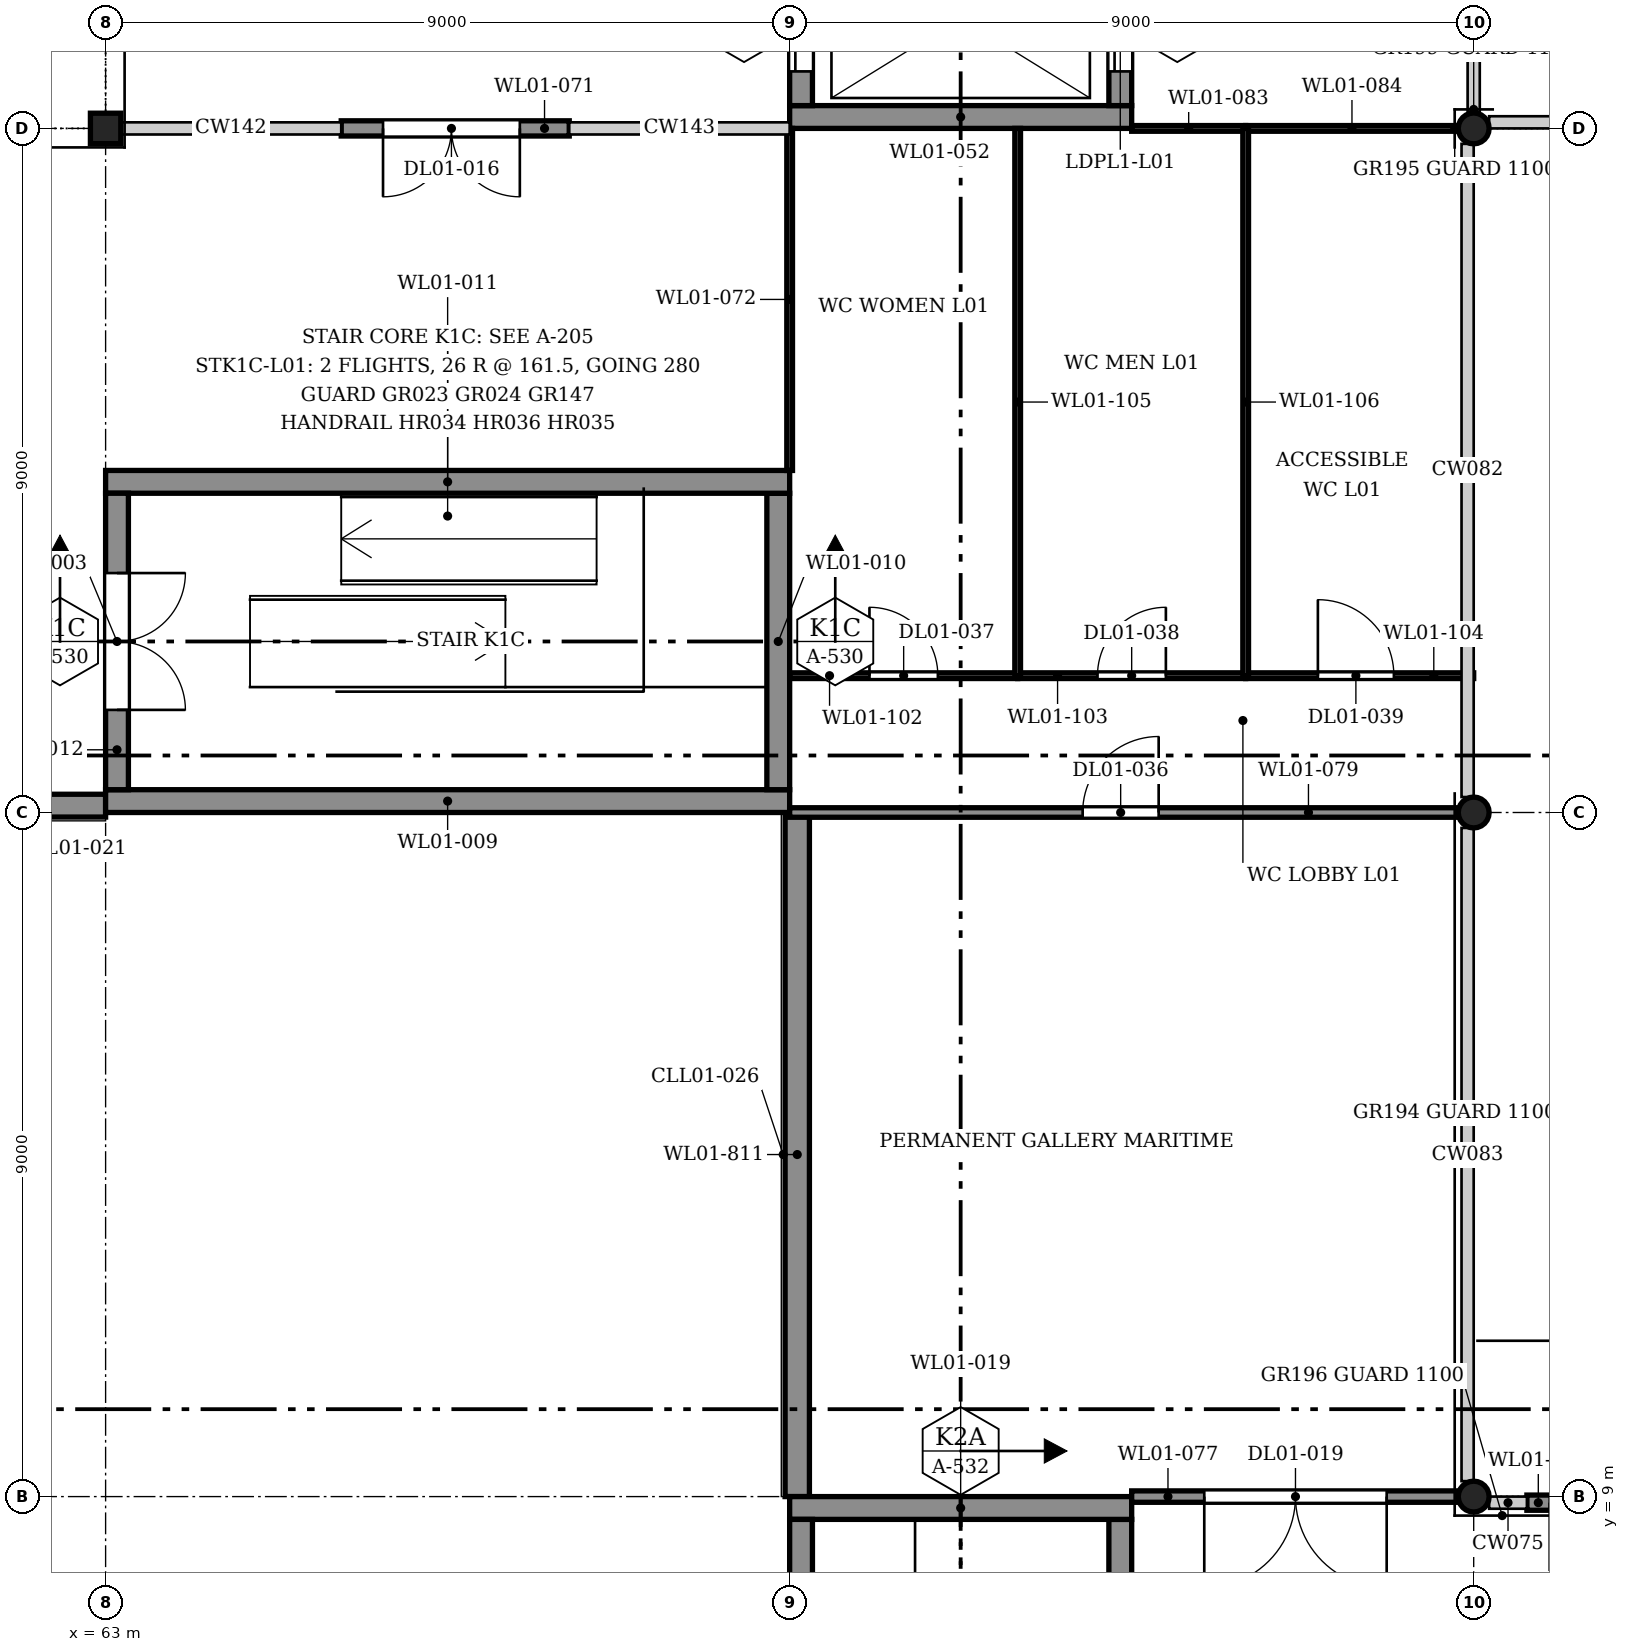
"""IFC4 building model, lengths in metres.
Left out: names, types, materials, properties, quantities, classifications, styles, units other than length and angle.
Written with IfcOpenShell. Run it as: python <this file> out.ifc"""

import sys

from ifc_helpers import new_model, si_unit, direction, frame, frame_2d, origin, origin_2d, place, context, subcontext, project, spatial, rectangle, hollow_rectangle, hollow_circle, extrude, element, fill, save


model = new_model("IFC4")
c1 = context("Model", 3, precision=1e-05, world=origin(), true_north=direction((0.0, 1.0)))
c2 = subcontext(c1, "Body", "Model", "MODEL_VIEW")
j1 = project(units=[si_unit("LENGTHUNIT", "METRE"), si_unit("PLANEANGLEUNIT", "RADIAN")], contexts=[c1])
p1 = place(None, origin())
s1 = spatial("IfcSite", under=j1, at=p1, CompositionType="ELEMENT")
p2 = place(p1, origin())
s2 = spatial("IfcBuilding", under=s1, at=p2, CompositionType="ELEMENT")
p3 = place(p2, frame((0.0, 0.0, 5.0)))
s3 = spatial("IfcBuildingStorey", under=s2, at=p3, CompositionType="ELEMENT", Elevation=5.0)
for number, where, z_axis, x_axis in (
    (1, (81.0, 9.0, 0.0), (0.0, 0.0, 1.0), (1.0, 0.0, 0.0)),
    (2, (81.0, 18.0, 0.0), (0.0, 0.0, 1.0), (1.0, 0.0, 0.0)),
):
    element("IfcColumn", number, at=place(p3, frame(where, z_axis=z_axis, x_axis=x_axis)), inside=s3, PredefinedType="COLUMN", context=c2, shape_type="SweptSolid", body=[
        extrude(hollow_circle(Radius=0.203, WallThickness=0.013, at=origin_2d()), origin(), (0.0, 0.0, 1.0), 4.2),
    ])
p4 = place(p3, frame((63.0, 27.0, 0.0), z_axis=(0.0, 0.0, 1.0), x_axis=(1.0, 0.0, 0.0)))
e3 = element("IfcColumn", 3, at=p4, inside=s3, PredefinedType="COLUMN", context=c2, shape_type="SweptSolid", body=[
    extrude(hollow_rectangle(XDim=0.4, YDim=0.4, WallThickness=0.016, InnerFilletRadius=0.024, OuterFilletRadius=0.04, at=origin_2d()), origin(), (0.0, 0.0, 1.0), 4.2),
])
p5 = place(p3, frame((81.0, 27.0, 0.0), z_axis=(0.0, 0.0, 1.0), x_axis=(1.0, 0.0, 0.0)))
e4 = element("IfcColumn", 4, at=p5, inside=s3, PredefinedType="COLUMN", context=c2, shape_type="SweptSolid", body=[
    extrude(hollow_circle(Radius=0.203, WallThickness=0.013, at=origin_2d()), origin(), (0.0, 0.0, 1.0), 4.2),
])
p6 = place(p3, frame((54.25, 18.09, 0.0), z_axis=(0.0, 0.0, 1.0), x_axis=(1.0, 0.0, 0.0)))
e5 = element("IfcWall", 5, at=p6, inside=s3, PredefinedType="SOLIDWALL", context=c2, shape_type="SweptSolid", body=[
    extrude(rectangle(XDim=8.75, YDim=0.3, at=frame_2d((4.375, 0.0))), origin(), (0.0, 0.0, 1.0), 3.578),
])
p7 = place(p6, frame((1.4, 0.0, 0.9)))
e6 = element("IfcOpeningElement", 6, at=p7, cuts=e5, PredefinedType="OPENING", context=c2, shape_type="SweptSolid", body=[
    extrude(rectangle(XDim=1.2, YDim=2.3, at=frame_2d((0.6, 1.15))), frame((0.0, 0.16, 0.0), z_axis=(0.0, -1.0, 0.0), x_axis=(1.0, 0.0, 0.0)), (0.0, 0.0, 1.0), 0.32),
])
p8 = place(p6, frame((5.9, 0.0, 0.9)))
e7 = element("IfcOpeningElement", 7, at=p8, cuts=e5, PredefinedType="OPENING", context=c2, shape_type="SweptSolid", body=[
    extrude(rectangle(XDim=1.2, YDim=2.3, at=frame_2d((0.6, 1.15))), frame((0.0, 0.16, 0.0), z_axis=(0.0, -1.0, 0.0), x_axis=(1.0, 0.0, 0.0)), (0.0, 0.0, 1.0), 0.32),
])
p9 = place(p3, frame((72.1, 9.0, 0.0), z_axis=(0.0, 0.0, 1.0), x_axis=(0.0, 1.0, 0.0)))
e8 = element("IfcWall", 8, at=p9, inside=s3, PredefinedType="SOLIDWALL", context=c2, shape_type="SweptSolid", body=[
    extrude(rectangle(XDim=9.0, YDim=0.32, at=frame_2d((4.5, 0.0))), origin(), (0.0, 0.0, 1.0), 4.035),
])
p10 = place(p3, frame((81.7, 8.92, 0.0), z_axis=(0.0, 0.0, 1.0), x_axis=(1.0, 0.0, 0.0)))
e9 = element("IfcWall", 9, at=p10, inside=s3, PredefinedType="SOLIDWALL", context=c2, shape_type="SweptSolid", body=[
    extrude(rectangle(XDim=2.4, YDim=0.2, at=frame_2d((1.2, 0.0))), origin(), (0.0, 0.0, 1.0), 3.125),
])
p11 = place(p10, frame((0.3, 0.0, 0.0)))
e10 = element("IfcOpeningElement", 10, at=p11, cuts=e9, PredefinedType="OPENING", context=c2, shape_type="SweptSolid", body=[
    extrude(rectangle(XDim=1.8, YDim=2.4, at=frame_2d((0.9, 1.2))), frame((0.0, 0.11, 0.0), z_axis=(0.0, -1.0, 0.0), x_axis=(1.0, 0.0, 0.0)), (0.0, 0.0, 1.0), 0.22),
])
p12 = place(p3, frame((63.0, 18.15, 0.0), z_axis=(0.0, 0.0, 1.0), x_axis=(1.0, 0.0, 0.0)))
e11 = element("IfcWall", 11, at=p12, inside=s3, PredefinedType="SOLIDWALL", context=c2, shape_type="SweptSolid", body=[
    extrude(rectangle(XDim=9.0, YDim=0.3, at=frame_2d((4.5, 0.0))), origin(), (0.0, 0.0, 1.0), 4.2),
])
p13 = place(p3, frame((71.85, 18.3, 0.0), z_axis=(0.0, 0.0, 1.0), x_axis=(0.0, 1.0, 0.0)))
e12 = element("IfcWall", 12, at=p13, inside=s3, PredefinedType="SOLIDWALL", context=c2, shape_type="SweptSolid", body=[
    extrude(rectangle(XDim=3.9, YDim=0.3, at=frame_2d((1.95, 0.0))), origin(), (0.0, 0.0, 1.0), 4.2),
])
p14 = place(p3, frame((63.0, 22.35, 0.0), z_axis=(0.0, 0.0, 1.0), x_axis=(1.0, 0.0, 0.0)))
e13 = element("IfcWall", 13, at=p14, inside=s3, PredefinedType="SOLIDWALL", context=c2, shape_type="SweptSolid", body=[
    extrude(rectangle(XDim=9.0, YDim=0.3, at=frame_2d((4.5, 0.0))), origin(), (0.0, 0.0, 1.0), 4.2),
])
p15 = place(p3, frame((63.15, 18.3, 0.0), z_axis=(0.0, 0.0, 1.0), x_axis=(0.0, 1.0, 0.0)))
e14 = element("IfcWall", 14, at=p15, inside=s3, PredefinedType="SOLIDWALL", context=c2, shape_type="SweptSolid", body=[
    extrude(rectangle(XDim=3.9, YDim=0.3, at=frame_2d((1.95, 0.0))), origin(), (0.0, 0.0, 1.0), 4.2),
])
p16 = place(p15, frame((1.05, 0.0, 0.0)))
e15 = element("IfcOpeningElement", 15, at=p16, cuts=e14, PredefinedType="OPENING", context=c2, shape_type="SweptSolid", body=[
    extrude(rectangle(XDim=1.8, YDim=2.1, at=frame_2d((0.9, 1.05))), frame((0.0, 0.16, 0.0), z_axis=(0.0, -1.0, 0.0), x_axis=(1.0, 0.0, 0.0)), (0.0, 0.0, 1.0), 0.32),
])
p17 = place(p3, frame((76.35, 0.3, 0.0), z_axis=(0.0, 0.0, 1.0), x_axis=(0.0, 1.0, 0.0)))
e16 = element("IfcWall", 16, at=p17, inside=s3, PredefinedType="SOLIDWALL", context=c2, shape_type="SweptSolid", body=[
    extrude(rectangle(XDim=8.4, YDim=0.3, at=frame_2d((4.2, 0.0))), origin(), (0.0, 0.0, 1.0), 4.2),
])
p18 = place(p17, frame((0.25, 0.0, 0.0)))
e17 = element("IfcOpeningElement", 17, at=p18, cuts=e16, PredefinedType="OPENING", context=c2, shape_type="SweptSolid", body=[
    extrude(rectangle(XDim=1.2, YDim=2.1, at=frame_2d((0.6, 1.05))), frame((0.0, 0.16, 0.0), z_axis=(0.0, -1.0, 0.0), x_axis=(1.0, 0.0, 0.0)), (0.0, 0.0, 1.0), 0.32),
])
p19 = place(p3, frame((72.0, 8.85, 0.0), z_axis=(0.0, 0.0, 1.0), x_axis=(1.0, 0.0, 0.0)))
e18 = element("IfcWall", 18, at=p19, inside=s3, PredefinedType="SOLIDWALL", context=c2, shape_type="SweptSolid", body=[
    extrude(rectangle(XDim=4.5, YDim=0.3, at=frame_2d((2.25, 0.0))), origin(), (0.0, 0.0, 1.0), 4.2),
])
p20 = place(p3, frame((72.15, 0.3, 0.0), z_axis=(0.0, 0.0, 1.0), x_axis=(0.0, 1.0, 0.0)))
e19 = element("IfcWall", 19, at=p20, inside=s3, PredefinedType="SOLIDWALL", context=c2, shape_type="SweptSolid", body=[
    extrude(rectangle(XDim=8.4, YDim=0.3, at=frame_2d((4.2, 0.0))), origin(), (0.0, 0.0, 1.0), 4.2),
])
p21 = place(p3, frame((72.0, 27.15, 0.0), z_axis=(0.0, 0.0, 1.0), x_axis=(1.0, 0.0, 0.0)))
e20 = element("IfcWall", 20, at=p21, inside=s3, PredefinedType="SOLIDWALL", context=c2, shape_type="SweptSolid", body=[
    extrude(rectangle(XDim=4.5, YDim=0.3, at=frame_2d((2.25, 0.0))), origin(), (0.0, 0.0, 1.0), 4.2),
])
p22 = place(p3, frame((76.35, 27.3, 0.0), z_axis=(0.0, 0.0, 1.0), x_axis=(0.0, 1.0, 0.0)))
e21 = element("IfcWall", 21, at=p22, inside=s3, PredefinedType="SOLIDWALL", context=c2, shape_type="SweptSolid", body=[
    extrude(rectangle(XDim=8.4, YDim=0.3, at=frame_2d((4.2, 0.0))), origin(), (0.0, 0.0, 1.0), 4.2),
])
p23 = place(p22, frame((0.45, 0.0, 0.0)))
e22 = element("IfcOpeningElement", 22, at=p23, cuts=e21, PredefinedType="OPENING", context=c2, shape_type="SweptSolid", body=[
    extrude(rectangle(XDim=1.4, YDim=2.1, at=frame_2d((0.7, 1.05))), frame((0.0, 0.16, 0.0), z_axis=(0.0, -1.0, 0.0), x_axis=(1.0, 0.0, 0.0)), (0.0, 0.0, 1.0), 0.32),
])
p24 = place(p22, frame((4.925, 0.0, 0.0)))
e23 = element("IfcOpeningElement", 23, at=p24, cuts=e21, PredefinedType="OPENING", context=c2, shape_type="SweptSolid", body=[
    extrude(rectangle(XDim=1.0, YDim=2.1, at=frame_2d((0.5, 1.05))), frame((0.0, 0.16, 0.0), z_axis=(0.0, -1.0, 0.0), x_axis=(1.0, 0.0, 0.0)), (0.0, 0.0, 1.0), 0.32),
])
p25 = place(p3, frame((72.15, 27.3, 0.0), z_axis=(0.0, 0.0, 1.0), x_axis=(0.0, 1.0, 0.0)))
e24 = element("IfcWall", 24, at=p25, inside=s3, PredefinedType="SOLIDWALL", context=c2, shape_type="SweptSolid", body=[
    extrude(rectangle(XDim=8.4, YDim=0.3, at=frame_2d((4.2, 0.0))), origin(), (0.0, 0.0, 1.0), 4.2),
])
p26 = place(p25, frame((0.45, 0.0, 0.0)))
e25 = element("IfcOpeningElement", 25, at=p26, cuts=e24, PredefinedType="OPENING", context=c2, shape_type="SweptSolid", body=[
    extrude(rectangle(XDim=1.4, YDim=2.1, at=frame_2d((0.7, 1.05))), frame((0.0, 0.16, 0.0), z_axis=(0.0, -1.0, 0.0), x_axis=(1.0, 0.0, 0.0)), (0.0, 0.0, 1.0), 0.32),
])
p27 = place(p3, frame((66.1, 27.0, 0.0), z_axis=(0.0, 0.0, 1.0), x_axis=(1.0, 0.0, 0.0)))
e26 = element("IfcWall", 26, at=p27, inside=s3, PredefinedType="PARTITIONING", context=c2, shape_type="SweptSolid", body=[
    extrude(rectangle(XDim=3.0, YDim=0.2, at=frame_2d((1.5, 0.0))), origin(), (0.0, 0.0, 1.0), 3.502),
])
p28 = place(p27, frame((0.55, 0.0, 0.0)))
e27 = element("IfcOpeningElement", 27, at=p28, cuts=e26, PredefinedType="OPENING", context=c2, shape_type="SweptSolid", body=[
    extrude(rectangle(XDim=1.8, YDim=2.1, at=frame_2d((0.9, 1.05))), frame((0.0, 0.11, 0.0), z_axis=(0.0, -1.0, 0.0), x_axis=(1.0, 0.0, 0.0)), (0.0, 0.0, 1.0), 0.22),
])
p29 = place(p3, frame((72.0, 22.5, 0.0), z_axis=(0.0, 0.0, 1.0), x_axis=(0.0, 1.0, 0.0)))
e28 = element("IfcWall", 28, at=p29, inside=s3, PredefinedType="PARTITIONING", context=c2, shape_type="SweptSolid", body=[
    extrude(rectangle(XDim=4.5, YDim=0.075, at=frame_2d((2.25, 0.0))), origin(), (0.0, 0.0, 1.0), 3.502),
])
p30 = place(p3, frame((76.5, 9.0, 0.0), z_axis=(0.0, 0.0, 1.0), x_axis=(1.0, 0.0, 0.0)))
e29 = element("IfcWall", 29, at=p30, inside=s3, PredefinedType="PARTITIONING", context=c2, shape_type="SweptSolid", body=[
    extrude(rectangle(XDim=4.297, YDim=0.15, at=frame_2d((2.148, 0.0))), origin(), (0.0, 0.0, 1.0), 3.502),
])
p31 = place(p30, frame((0.955, 0.0, 0.0)))
e30 = element("IfcOpeningElement", 30, at=p31, cuts=e29, PredefinedType="OPENING", context=c2, shape_type="SweptSolid", body=[
    extrude(rectangle(XDim=2.4, YDim=2.4, at=frame_2d((1.2, 1.2))), frame((0.0, 0.085, 0.0), z_axis=(0.0, -1.0, 0.0), x_axis=(1.0, 0.0, 0.0)), (0.0, 0.0, 1.0), 0.17),
])
p32 = place(p3, frame((72.0, 18.0, 0.0), z_axis=(0.0, 0.0, 1.0), x_axis=(1.0, 0.0, 0.0)))
e31 = element("IfcWall", 31, at=p32, inside=s3, PredefinedType="PARTITIONING", context=c2, shape_type="SweptSolid", body=[
    extrude(rectangle(XDim=8.797, YDim=0.125, at=frame_2d((4.398, 0.0))), origin(), (0.0, 0.0, 1.0), 3.502),
])
p33 = place(p32, frame((3.855, 0.0, 0.0)))
e32 = element("IfcOpeningElement", 32, at=p33, cuts=e31, PredefinedType="OPENING", context=c2, shape_type="SweptSolid", body=[
    extrude(rectangle(XDim=1.0, YDim=2.1, at=frame_2d((0.5, 1.05))), frame((0.0, 0.073, 0.0), z_axis=(0.0, -1.0, 0.0), x_axis=(1.0, 0.0, 0.0)), (0.0, 0.0, 1.0), 0.145),
])
p34 = place(p3, frame((76.5, 27.0, 0.0), z_axis=(0.0, 0.0, 1.0), x_axis=(1.0, 0.0, 0.0)))
e33 = element("IfcWall", 33, at=p34, inside=s3, PredefinedType="PARTITIONING", context=c2, shape_type="SweptSolid", body=[
    extrude(rectangle(XDim=1.5, YDim=0.075, at=frame_2d((0.75, 0.0))), origin(), (0.0, 0.0, 1.0), 3.502),
])
p35 = place(p3, frame((78.0, 27.0, 0.0), z_axis=(0.0, 0.0, 1.0), x_axis=(1.0, 0.0, 0.0)))
e34 = element("IfcWall", 34, at=p35, inside=s3, PredefinedType="PARTITIONING", context=c2, shape_type="SweptSolid", body=[
    extrude(rectangle(XDim=2.797, YDim=0.075, at=frame_2d((1.398, 0.0))), origin(), (0.0, 0.0, 1.0), 3.502),
])
p36 = place(p3, frame((72.0, 19.8, 0.0), z_axis=(0.0, 0.0, 1.0), x_axis=(1.0, 0.0, 0.0)))
e35 = element("IfcWall", 35, at=p36, inside=s3, PredefinedType="PARTITIONING", context=c2, shape_type="SweptSolid", body=[
    extrude(rectangle(XDim=3.0, YDim=0.075, at=frame_2d((1.5, 0.0))), origin(), (0.0, 0.0, 1.0), 3.629),
])
p37 = place(p36, frame((1.05, 0.0, 0.0)))
e36 = element("IfcOpeningElement", 36, at=p37, cuts=e35, PredefinedType="OPENING", context=c2, shape_type="SweptSolid", body=[
    extrude(rectangle(XDim=0.9, YDim=2.1, at=frame_2d((0.45, 1.05))), frame((0.0, 0.047, 0.0), z_axis=(0.0, -1.0, 0.0), x_axis=(1.0, 0.0, 0.0)), (0.0, 0.0, 1.0), 0.095),
])
p38 = place(p3, frame((75.0, 19.8, 0.0), z_axis=(0.0, 0.0, 1.0), x_axis=(1.0, 0.0, 0.0)))
e37 = element("IfcWall", 37, at=p38, inside=s3, PredefinedType="PARTITIONING", context=c2, shape_type="SweptSolid", body=[
    extrude(rectangle(XDim=3.0, YDim=0.075, at=frame_2d((1.5, 0.0))), origin(), (0.0, 0.0, 1.0), 3.629),
])
p39 = place(p38, frame((1.05, 0.0, 0.0)))
e38 = element("IfcOpeningElement", 38, at=p39, cuts=e37, PredefinedType="OPENING", context=c2, shape_type="SweptSolid", body=[
    extrude(rectangle(XDim=0.9, YDim=2.1, at=frame_2d((0.45, 1.05))), frame((0.0, 0.047, 0.0), z_axis=(0.0, -1.0, 0.0), x_axis=(1.0, 0.0, 0.0)), (0.0, 0.0, 1.0), 0.095),
])
p40 = place(p3, frame((78.0, 19.8, 0.0), z_axis=(0.0, 0.0, 1.0), x_axis=(1.0, 0.0, 0.0)))
e39 = element("IfcWall", 39, at=p40, inside=s3, PredefinedType="PARTITIONING", context=c2, shape_type="SweptSolid", body=[
    extrude(rectangle(XDim=3.0, YDim=0.075, at=frame_2d((1.5, 0.0))), origin(), (0.0, 0.0, 1.0), 3.335),
])
p41 = place(p40, frame((0.95, 0.0, 0.0)))
e40 = element("IfcOpeningElement", 40, at=p41, cuts=e39, PredefinedType="OPENING", context=c2, shape_type="SweptSolid", body=[
    extrude(rectangle(XDim=1.0, YDim=2.1, at=frame_2d((0.5, 1.05))), frame((0.0, 0.047, 0.0), z_axis=(0.0, -1.0, 0.0), x_axis=(1.0, 0.0, 0.0)), (0.0, 0.0, 1.0), 0.095),
])
p42 = place(p3, frame((75.0, 19.8, 0.0), z_axis=(0.0, 0.0, 1.0), x_axis=(0.0, 1.0, 0.0)))
e41 = element("IfcWall", 41, at=p42, inside=s3, PredefinedType="PARTITIONING", context=c2, shape_type="SweptSolid", body=[
    extrude(rectangle(XDim=7.2, YDim=0.075, at=frame_2d((3.6, 0.0))), origin(), (0.0, 0.0, 1.0), 3.629),
])
p43 = place(p3, frame((78.0, 19.8, 0.0), z_axis=(0.0, 0.0, 1.0), x_axis=(0.0, 1.0, 0.0)))
e42 = element("IfcWall", 42, at=p43, inside=s3, PredefinedType="PARTITIONING", context=c2, shape_type="SweptSolid", body=[
    extrude(rectangle(XDim=7.2, YDim=0.075, at=frame_2d((3.6, 0.0))), origin(), (0.0, 0.0, 1.0), 3.502),
])
p44 = place(p16, frame((1.8, 0.0, 0.0), z_axis=(0.0, 0.0, 1.0), x_axis=(-1.0, 0.0, 0.0)))
e43 = element("IfcDoor", 43, at=p44, inside=s3, OperationType="DOUBLE_DOOR_SINGLE_SWING", PredefinedType="DOOR", context=c2, shape_type="SweptSolid", body=[
    extrude(rectangle(XDim=1.8, YDim=2.1, at=frame_2d((0.9, 1.05))), frame((0.0, 0.025, 0.0), z_axis=(0.0, -1.0, 0.0), x_axis=(1.0, 0.0, 0.0)), (0.0, 0.0, 1.0), 0.05),
])
fill(e15, e43)
p45 = place(p23, origin())
e44 = element("IfcDoor", 44, at=p45, inside=s3, OperationType="SLIDING_TO_LEFT", PredefinedType="DOOR", context=c2, shape_type="SweptSolid", body=[
    extrude(rectangle(XDim=1.4, YDim=2.1, at=frame_2d((0.7, 1.05))), frame((0.0, 0.025, 0.0), z_axis=(0.0, -1.0, 0.0), x_axis=(1.0, 0.0, 0.0)), (0.0, 0.0, 1.0), 0.05),
])
fill(e22, e44)
p46 = place(p26, origin())
e45 = element("IfcDoor", 45, at=p46, inside=s3, OperationType="SLIDING_TO_RIGHT", PredefinedType="DOOR", context=c2, shape_type="SweptSolid", body=[
    extrude(rectangle(XDim=1.4, YDim=2.1, at=frame_2d((0.7, 1.05))), frame((0.0, 0.025, 0.0), z_axis=(0.0, -1.0, 0.0), x_axis=(1.0, 0.0, 0.0)), (0.0, 0.0, 1.0), 0.05),
])
fill(e25, e45)
p47 = place(p28, frame((1.8, 0.0, 0.0), z_axis=(0.0, 0.0, 1.0), x_axis=(-1.0, 0.0, 0.0)))
e46 = element("IfcDoor", 46, at=p47, inside=s3, OperationType="DOUBLE_DOOR_SINGLE_SWING", PredefinedType="DOOR", context=c2, shape_type="SweptSolid", body=[
    extrude(rectangle(XDim=1.8, YDim=2.1, at=frame_2d((0.9, 1.05))), frame((0.0, 0.025, 0.0), z_axis=(0.0, -1.0, 0.0), x_axis=(1.0, 0.0, 0.0)), (0.0, 0.0, 1.0), 0.05),
])
fill(e27, e46)
p48 = place(p31, frame((2.4, 0.0, 0.0), z_axis=(0.0, 0.0, 1.0), x_axis=(-1.0, 0.0, 0.0)))
e47 = element("IfcDoor", 47, at=p48, inside=s3, OperationType="DOUBLE_DOOR_SINGLE_SWING", PredefinedType="DOOR", context=c2, shape_type="SweptSolid", body=[
    extrude(rectangle(XDim=2.4, YDim=2.4, at=frame_2d((1.2, 1.2))), frame((0.0, 0.025, 0.0), z_axis=(0.0, -1.0, 0.0), x_axis=(1.0, 0.0, 0.0)), (0.0, 0.0, 1.0), 0.05),
])
fill(e30, e47)
p49 = place(p33, origin())
e48 = element("IfcDoor", 48, at=p49, inside=s3, OperationType="SINGLE_SWING_LEFT", PredefinedType="DOOR", context=c2, shape_type="SweptSolid", body=[
    extrude(rectangle(XDim=1.0, YDim=2.1, at=frame_2d((0.5, 1.05))), frame((0.0, 0.025, 0.0), z_axis=(0.0, -1.0, 0.0), x_axis=(1.0, 0.0, 0.0)), (0.0, 0.0, 1.0), 0.05),
])
fill(e32, e48)
p50 = place(p37, origin())
e49 = element("IfcDoor", 49, at=p50, inside=s3, OperationType="SINGLE_SWING_RIGHT", PredefinedType="DOOR", context=c2, shape_type="SweptSolid", body=[
    extrude(rectangle(XDim=0.9, YDim=2.1, at=frame_2d((0.45, 1.05))), frame((0.0, 0.025, 0.0), z_axis=(0.0, -1.0, 0.0), x_axis=(1.0, 0.0, 0.0)), (0.0, 0.0, 1.0), 0.05),
])
fill(e36, e49)
p51 = place(p39, origin())
e50 = element("IfcDoor", 50, at=p51, inside=s3, OperationType="SINGLE_SWING_LEFT", PredefinedType="DOOR", context=c2, shape_type="SweptSolid", body=[
    extrude(rectangle(XDim=0.9, YDim=2.1, at=frame_2d((0.45, 1.05))), frame((0.0, 0.025, 0.0), z_axis=(0.0, -1.0, 0.0), x_axis=(1.0, 0.0, 0.0)), (0.0, 0.0, 1.0), 0.05),
])
fill(e38, e50)
p52 = place(p41, origin())
e51 = element("IfcDoor", 51, at=p52, inside=s3, OperationType="SINGLE_SWING_RIGHT", PredefinedType="DOOR", context=c2, shape_type="SweptSolid", body=[
    extrude(rectangle(XDim=1.0, YDim=2.1, at=frame_2d((0.5, 1.05))), frame((0.0, 0.025, 0.0), z_axis=(0.0, -1.0, 0.0), x_axis=(1.0, 0.0, 0.0)), (0.0, 0.0, 1.0), 0.05),
])
fill(e40, e51)
save(model, sys.argv[1])
